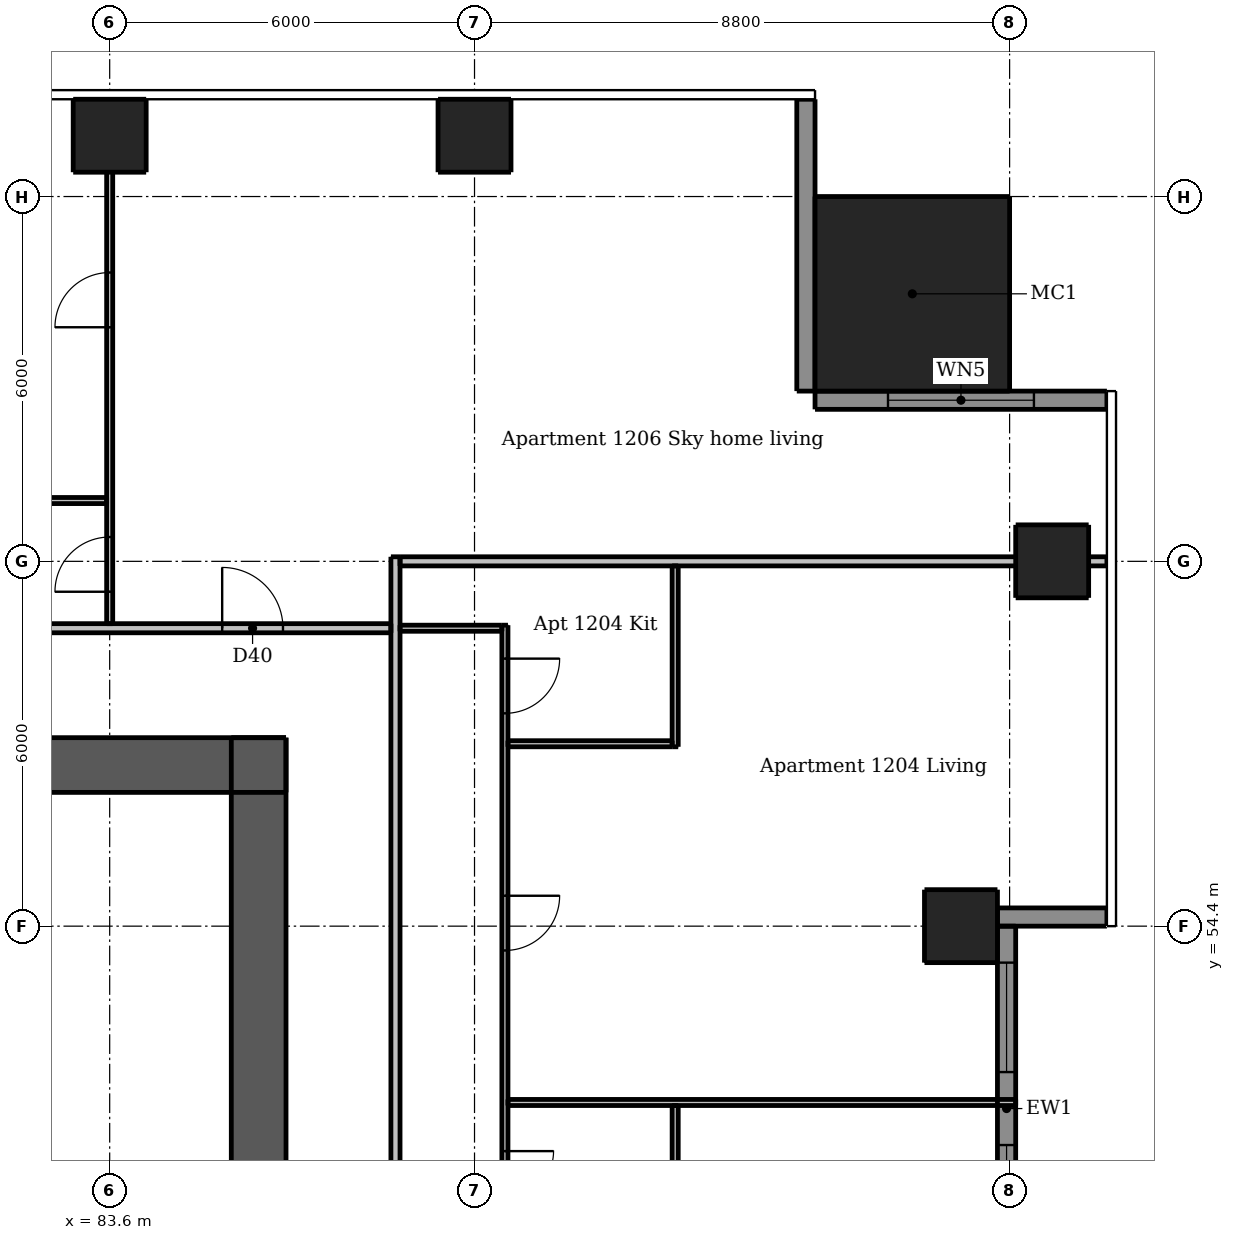
"""IFC4 building model, lengths in metres.
Left out: names, types, materials, properties, quantities, classifications, styles, units other than length and angle.
Written with IfcOpenShell. Run it as: python <this file> out.ifc"""

import sys

from ifc_helpers import new_model, si_unit, direction, frame, frame_2d, origin, origin_2d, place, context, subcontext, project, spatial, rectangle, extrude, element, fill, save


model = new_model("IFC4")
c1 = context("Model", 3, precision=1e-05, world=origin(), true_north=direction((0.0, 1.0)))
c2 = subcontext(c1, "Body", "Model", "MODEL_VIEW")
j1 = project(units=[si_unit("LENGTHUNIT", "METRE"), si_unit("PLANEANGLEUNIT", "RADIAN")], contexts=[c1])
p1 = place(None, origin())
s1 = spatial("IfcSite", under=j1, at=p1, CompositionType="ELEMENT")
p2 = place(p1, origin())
s2 = spatial("IfcBuilding", under=s1, at=p2, CompositionType="ELEMENT")
p3 = place(p2, frame((0.0, 0.0, 46.6)))
s3 = spatial("IfcBuildingStorey", under=s2, at=p3, CompositionType="ELEMENT", Elevation=46.6)
p4 = place(p3, frame((62.5, 57.05, 0.0), z_axis=(0.0, 0.0, 1.0), x_axis=(1.0, 0.0, 0.0)))
e1 = element("IfcWall", 1, at=p4, inside=s3, PredefinedType="SHEAR", context=c2, shape_type="SweptSolid", body=[
    extrude(rectangle(XDim=24.0, YDim=0.9, at=frame_2d((12.0, 0.0))), origin(), (0.0, 0.0, 1.0), 3.05),
])
p5 = place(p4, frame((20.85, 0.0, 0.0)))
e2 = element("IfcOpeningElement", 2, at=p5, cuts=e1, PredefinedType="OPENING", context=c2, shape_type="SweptSolid", body=[
    extrude(rectangle(XDim=1.1, YDim=2.1, at=frame_2d((0.55, 1.05))), frame((0.0, 0.46, 0.0), z_axis=(0.0, -1.0, 0.0), x_axis=(1.0, 0.0, 0.0)), (0.0, 0.0, 1.0), 0.92),
])
p6 = place(p4, frame((2.05, 0.0, 0.0)))
e3 = element("IfcOpeningElement", 3, at=p6, cuts=e1, PredefinedType="OPENING", context=c2, shape_type="SweptSolid", body=[
    extrude(rectangle(XDim=1.1, YDim=2.1, at=frame_2d((0.55, 1.05))), frame((0.0, 0.46, 0.0), z_axis=(0.0, -1.0, 0.0), x_axis=(1.0, 0.0, 0.0)), (0.0, 0.0, 1.0), 0.92),
])
p7 = place(p4, frame((6.075, 0.0, 0.0)))
e4 = element("IfcOpeningElement", 4, at=p7, cuts=e1, PredefinedType="OPENING", context=c2, shape_type="SweptSolid", body=[
    extrude(rectangle(XDim=0.9, YDim=2.1, at=frame_2d((0.45, 1.05))), frame((0.0, 0.46, 0.0), z_axis=(0.0, -1.0, 0.0), x_axis=(1.0, 0.0, 0.0)), (0.0, 0.0, 1.0), 0.92),
])
p8 = place(p4, frame((10.455, 0.0, 0.0)))
e5 = element("IfcOpeningElement", 5, at=p8, cuts=e1, PredefinedType="OPENING", context=c2, shape_type="SweptSolid", body=[
    extrude(rectangle(XDim=0.9, YDim=2.1, at=frame_2d((0.45, 1.05))), frame((0.0, 0.46, 0.0), z_axis=(0.0, -1.0, 0.0), x_axis=(1.0, 0.0, 0.0)), (0.0, 0.0, 1.0), 0.92),
])
p9 = place(p4, frame((15.93, 0.0, 0.0)))
e6 = element("IfcOpeningElement", 6, at=p9, cuts=e1, PredefinedType="OPENING", context=c2, shape_type="SweptSolid", body=[
    extrude(rectangle(XDim=0.9, YDim=2.1, at=frame_2d((0.45, 1.05))), frame((0.0, 0.46, 0.0), z_axis=(0.0, -1.0, 0.0), x_axis=(1.0, 0.0, 0.0)), (0.0, 0.0, 1.0), 0.92),
])
p10 = place(p3, frame((86.05, 33.5, 0.0), z_axis=(0.0, 0.0, 1.0), x_axis=(0.0, 1.0, 0.0)))
e7 = element("IfcWall", 7, at=p10, inside=s3, PredefinedType="SHEAR", context=c2, shape_type="SweptSolid", body=[
    extrude(rectangle(XDim=24.0, YDim=0.9, at=frame_2d((12.0, 0.0))), origin(), (0.0, 0.0, 1.0), 3.05),
])
p11 = place(p10, frame((11.2, 0.0, 0.0)))
e8 = element("IfcOpeningElement", 8, at=p11, cuts=e7, PredefinedType="OPENING", context=c2, shape_type="SweptSolid", body=[
    extrude(rectangle(XDim=1.6, YDim=2.1, at=frame_2d((0.8, 1.05))), frame((0.0, 0.46, 0.0), z_axis=(0.0, -1.0, 0.0), x_axis=(1.0, 0.0, 0.0)), (0.0, 0.0, 1.0), 0.92),
])
for number, where, z_axis, x_axis in (
    (9, (97.6, 54.4, 0.0), (0.0, 0.0, 1.0), (1.0, 0.0, 0.0)),
    (10, (99.1, 60.4, 0.0), (0.0, 0.0, 1.0), (1.0, 0.0, 0.0)),
    (11, (83.6, 67.4, 0.0), (0.0, 0.0, 1.0), (1.0, 0.0, 0.0)),
    (12, (89.6, 67.4, 0.0), (0.0, 0.0, 1.0), (1.0, 0.0, 0.0)),
):
    element("IfcColumn", number, at=place(p3, frame(where, z_axis=z_axis, x_axis=x_axis)), inside=s3, PredefinedType="COLUMN", context=c2, shape_type="SweptSolid", body=[
        extrude(rectangle(XDim=1.2, YDim=1.2, at=origin_2d()), origin(), (0.0, 0.0, 1.0), 3.05),
    ])
p12 = place(p3, frame((96.8, 64.8, 0.0), z_axis=(0.0, 0.0, 1.0), x_axis=(1.0, 0.0, 0.0)))
e13 = element("IfcColumn", 13, at=p12, inside=s3, PredefinedType="COLUMN", context=c2, shape_type="SweptSolid", body=[
    extrude(rectangle(XDim=3.2, YDim=3.2, at=origin_2d()), origin(), (0.0, 0.0, 1.0), 3.3),
])
p13 = place(p3, frame((98.2, 54.55, 0.0), z_axis=(0.0, 0.0, 1.0), x_axis=(1.0, 0.0, 0.0)))
e14 = element("IfcWall", 14, at=p13, inside=s3, PredefinedType="SOLIDWALL", context=c2, shape_type="SweptSolid", body=[
    extrude(rectangle(XDim=1.8, YDim=0.3, at=frame_2d((0.9, 0.0))), origin(), (0.0, 0.0, 1.0), 3.05),
])
p14 = place(p3, frame((100.0, 63.05, 0.0), z_axis=(0.0, 0.0, 1.0), x_axis=(-1.0, 0.0, 0.0)))
e15 = element("IfcWall", 15, at=p14, inside=s3, PredefinedType="SOLIDWALL", context=c2, shape_type="SweptSolid", body=[
    extrude(rectangle(XDim=4.8, YDim=0.3, at=frame_2d((2.4, 0.0))), origin(), (0.0, 0.0, 1.0), 3.05),
])
p15 = place(p14, frame((1.2, 0.0, 0.15)))
e16 = element("IfcOpeningElement", 16, at=p15, cuts=e15, PredefinedType="OPENING", context=c2, shape_type="SweptSolid", body=[
    extrude(rectangle(XDim=2.4, YDim=2.1, at=frame_2d((1.2, 1.05))), frame((0.0, 0.16, 0.0), z_axis=(0.0, -1.0, 0.0), x_axis=(1.0, 0.0, 0.0)), (0.0, 0.0, 1.0), 0.32),
])
p16 = place(p3, frame((95.05, 63.2, 0.0), z_axis=(0.0, 0.0, 1.0), x_axis=(0.0, 1.0, 0.0)))
e17 = element("IfcWall", 17, at=p16, inside=s3, PredefinedType="SOLIDWALL", context=c2, shape_type="SweptSolid", body=[
    extrude(rectangle(XDim=4.8, YDim=0.3, at=frame_2d((2.4, 0.0))), origin(), (0.0, 0.0, 1.0), 3.05),
])
p17 = place(p3, frame((98.35, 48.4, 0.0), z_axis=(0.0, 0.0, 1.0), x_axis=(0.0, 1.0, 0.0)))
e18 = element("IfcWall", 18, at=p17, inside=s3, PredefinedType="SOLIDWALL", context=c2, shape_type="SweptSolid", body=[
    extrude(rectangle(XDim=6.0, YDim=0.3, at=frame_2d((3.0, 0.0))), origin(), (0.0, 0.0, 1.0), 3.05),
])
p18 = place(p17, frame((0.6, 0.0, 0.15)))
e19 = element("IfcOpeningElement", 19, at=p18, cuts=e18, PredefinedType="OPENING", context=c2, shape_type="SweptSolid", body=[
    extrude(rectangle(XDim=1.8, YDim=2.1, at=frame_2d((0.9, 1.05))), frame((0.0, 0.16, 0.0), z_axis=(0.0, -1.0, 0.0), x_axis=(1.0, 0.0, 0.0)), (0.0, 0.0, 1.0), 0.32),
])
p19 = place(p17, frame((3.6, 0.0, 0.15)))
e20 = element("IfcOpeningElement", 20, at=p19, cuts=e18, PredefinedType="OPENING", context=c2, shape_type="SweptSolid", body=[
    extrude(rectangle(XDim=1.8, YDim=2.1, at=frame_2d((0.9, 1.05))), frame((0.0, 0.16, 0.0), z_axis=(0.0, -1.0, 0.0), x_axis=(1.0, 0.0, 0.0)), (0.0, 0.0, 1.0), 0.32),
])
p20 = place(p3, frame((83.6, 59.375, 0.0), z_axis=(0.0, 0.0, 1.0), x_axis=(0.0, 1.0, 0.0)))
e21 = element("IfcWall", 21, at=p20, inside=s3, PredefinedType="PARTITIONING", context=c2, shape_type="SweptSolid", body=[
    extrude(rectangle(XDim=8.625, YDim=0.1, at=frame_2d((4.312, 0.0))), origin(), (0.0, 0.0, 1.0), 2.516),
])
p21 = place(p20, frame((0.525, 0.0, 0.0)))
e22 = element("IfcOpeningElement", 22, at=p21, cuts=e21, PredefinedType="OPENING", context=c2, shape_type="SweptSolid", body=[
    extrude(rectangle(XDim=0.9, YDim=2.1, at=frame_2d((0.45, 1.05))), frame((0.0, 0.06, 0.0), z_axis=(0.0, -1.0, 0.0), x_axis=(1.0, 0.0, 0.0)), (0.0, 0.0, 1.0), 0.12),
])
p22 = place(p20, frame((4.875, 0.0, 0.0)))
e23 = element("IfcOpeningElement", 23, at=p22, cuts=e21, PredefinedType="OPENING", context=c2, shape_type="SweptSolid", body=[
    extrude(rectangle(XDim=0.9, YDim=2.1, at=frame_2d((0.45, 1.05))), frame((0.0, 0.06, 0.0), z_axis=(0.0, -1.0, 0.0), x_axis=(1.0, 0.0, 0.0)), (0.0, 0.0, 1.0), 0.12),
])
p23 = place(p3, frame((90.1, 59.35, 0.0), z_axis=(0.0, 0.0, 1.0), x_axis=(0.0, -1.0, 0.0)))
e24 = element("IfcWall", 24, at=p23, inside=s3, PredefinedType="PARTITIONING", context=c2, shape_type="SweptSolid", body=[
    extrude(rectangle(XDim=19.775, YDim=0.1, at=frame_2d((9.888, 0.0))), origin(), (0.0, 0.0, 1.0), 3.05),
])
p24 = place(p23, frame((4.45, 0.0, 0.0)))
e25 = element("IfcOpeningElement", 25, at=p24, cuts=e24, PredefinedType="OPENING", context=c2, shape_type="SweptSolid", body=[
    extrude(rectangle(XDim=0.9, YDim=2.1, at=frame_2d((0.45, 1.05))), frame((0.0, 0.06, 0.0), z_axis=(0.0, -1.0, 0.0), x_axis=(1.0, 0.0, 0.0)), (0.0, 0.0, 1.0), 0.12),
])
p25 = place(p23, frame((0.55, 0.0, 0.0)))
e26 = element("IfcOpeningElement", 26, at=p25, cuts=e24, PredefinedType="OPENING", context=c2, shape_type="SweptSolid", body=[
    extrude(rectangle(XDim=0.9, YDim=2.1, at=frame_2d((0.45, 1.05))), frame((0.0, 0.06, 0.0), z_axis=(0.0, -1.0, 0.0), x_axis=(1.0, 0.0, 0.0)), (0.0, 0.0, 1.0), 0.12),
])
p26 = place(p23, frame((17.6, 0.0, 0.0)))
e27 = element("IfcOpeningElement", 27, at=p26, cuts=e24, PredefinedType="OPENING", context=c2, shape_type="SweptSolid", body=[
    extrude(rectangle(XDim=0.9, YDim=2.1, at=frame_2d((0.45, 1.05))), frame((0.0, 0.06, 0.0), z_axis=(0.0, -1.0, 0.0), x_axis=(1.0, 0.0, 0.0)), (0.0, 0.0, 1.0), 0.12),
])
p27 = place(p23, frame((11.6, 0.0, 0.0)))
e28 = element("IfcOpeningElement", 28, at=p27, cuts=e24, PredefinedType="OPENING", context=c2, shape_type="SweptSolid", body=[
    extrude(rectangle(XDim=0.9, YDim=2.1, at=frame_2d((0.45, 1.05))), frame((0.0, 0.06, 0.0), z_axis=(0.0, -1.0, 0.0), x_axis=(1.0, 0.0, 0.0)), (0.0, 0.0, 1.0), 0.12),
])
p28 = place(p23, frame((14.65, 0.0, 0.0)))
e29 = element("IfcOpeningElement", 29, at=p28, cuts=e24, PredefinedType="OPENING", context=c2, shape_type="SweptSolid", body=[
    extrude(rectangle(XDim=0.8, YDim=2.1, at=frame_2d((0.4, 1.05))), frame((0.0, 0.06, 0.0), z_axis=(0.0, -1.0, 0.0), x_axis=(1.0, 0.0, 0.0)), (0.0, 0.0, 1.0), 0.12),
])
p29 = place(p23, frame((8.65, 0.0, 0.0)))
e30 = element("IfcOpeningElement", 30, at=p29, cuts=e24, PredefinedType="OPENING", context=c2, shape_type="SweptSolid", body=[
    extrude(rectangle(XDim=0.8, YDim=2.1, at=frame_2d((0.4, 1.05))), frame((0.0, 0.06, 0.0), z_axis=(0.0, -1.0, 0.0), x_axis=(1.0, 0.0, 0.0)), (0.0, 0.0, 1.0), 0.12),
])
p30 = place(p3, frame((92.9, 49.05, 0.0), z_axis=(0.0, 0.0, 1.0), x_axis=(0.0, 1.0, 0.0)))
e31 = element("IfcWall", 31, at=p30, inside=s3, PredefinedType="PARTITIONING", context=c2, shape_type="SweptSolid", body=[
    extrude(rectangle(XDim=2.4, YDim=0.1, at=frame_2d((1.2, 0.0))), origin(), (0.0, 0.0, 1.0), 3.05),
])
p31 = place(p3, frame((92.9, 57.35, 0.0), z_axis=(0.0, 0.0, 1.0), x_axis=(0.0, 1.0, 0.0)))
e32 = element("IfcWall", 32, at=p31, inside=s3, PredefinedType="PARTITIONING", context=c2, shape_type="SweptSolid", body=[
    extrude(rectangle(XDim=2.975, YDim=0.1, at=frame_2d((1.487, 0.0))), origin(), (0.0, 0.0, 1.0), 3.05),
])
p32 = place(p3, frame((83.55, 61.4, 0.0), z_axis=(0.0, 0.0, 1.0), x_axis=(-1.0, 0.0, 0.0)))
e33 = element("IfcWall", 33, at=p32, inside=s3, PredefinedType="PARTITIONING", context=c2, shape_type="SweptSolid", body=[
    extrude(rectangle(XDim=5.875, YDim=0.1, at=frame_2d((2.938, 0.0))), origin(), (0.0, 0.0, 1.0), 3.05),
])
p33 = place(p32, frame((3.75, 0.0, 0.0)))
e34 = element("IfcOpeningElement", 34, at=p33, cuts=e33, PredefinedType="OPENING", context=c2, shape_type="SweptSolid", body=[
    extrude(rectangle(XDim=0.8, YDim=2.1, at=frame_2d((0.4, 1.05))), frame((0.0, 0.06, 0.0), z_axis=(0.0, -1.0, 0.0), x_axis=(1.0, 0.0, 0.0)), (0.0, 0.0, 1.0), 0.12),
])
p34 = place(p3, frame((88.375, 59.3, 0.0), z_axis=(0.0, 0.0, 1.0), x_axis=(1.0, 0.0, 0.0)))
e35 = element("IfcWall", 35, at=p34, inside=s3, PredefinedType="PARTITIONING", context=c2, shape_type="SweptSolid", body=[
    extrude(rectangle(XDim=1.675, YDim=0.1, at=frame_2d((0.837, 0.0))), origin(), (0.0, 0.0, 1.0), 3.05),
])
p35 = place(p3, frame((90.15, 57.4, 0.0), z_axis=(0.0, 0.0, 1.0), x_axis=(1.0, 0.0, 0.0)))
e36 = element("IfcWall", 36, at=p35, inside=s3, PredefinedType="PARTITIONING", context=c2, shape_type="SweptSolid", body=[
    extrude(rectangle(XDim=2.7, YDim=0.1, at=frame_2d((1.35, 0.0))), origin(), (0.0, 0.0, 1.0), 3.05),
])
p36 = place(p3, frame((90.15, 51.5, 0.0), z_axis=(0.0, 0.0, 1.0), x_axis=(1.0, 0.0, 0.0)))
e37 = element("IfcWall", 37, at=p36, inside=s3, PredefinedType="PARTITIONING", context=c2, shape_type="SweptSolid", body=[
    extrude(rectangle(XDim=8.35, YDim=0.1, at=frame_2d((4.175, 0.0))), origin(), (0.0, 0.0, 1.0), 3.05),
])
p37 = place(p3, frame((88.3, 60.475, 0.0), z_axis=(0.0, 0.0, 1.0), x_axis=(0.0, -1.0, 0.0)))
e38 = element("IfcWall", 38, at=p37, inside=s3, PredefinedType="PARTITIONING", context=c2, shape_type="SweptSolid", body=[
    extrude(rectangle(XDim=28.7, YDim=0.15, at=frame_2d((14.35, 0.0))), origin(), (0.0, 0.0, 1.0), 3.05),
])
p38 = place(p37, frame((27.425, 0.0, 0.0)))
e39 = element("IfcOpeningElement", 39, at=p38, cuts=e38, PredefinedType="OPENING", context=c2, shape_type="SweptSolid", body=[
    extrude(rectangle(XDim=1.0, YDim=2.1, at=frame_2d((0.5, 1.05))), frame((0.0, 0.085, 0.0), z_axis=(0.0, -1.0, 0.0), x_axis=(1.0, 0.0, 0.0)), (0.0, 0.0, 1.0), 0.17),
])
p39 = place(p37, frame((10.575, 0.0, 0.0)))
e40 = element("IfcOpeningElement", 40, at=p39, cuts=e38, PredefinedType="OPENING", context=c2, shape_type="SweptSolid", body=[
    extrude(rectangle(XDim=1.0, YDim=2.1, at=frame_2d((0.5, 1.05))), frame((0.0, 0.085, 0.0), z_axis=(0.0, -1.0, 0.0), x_axis=(1.0, 0.0, 0.0)), (0.0, 0.0, 1.0), 0.17),
])
p40 = place(p3, frame((88.375, 60.4, 0.0), z_axis=(0.0, 0.0, 1.0), x_axis=(1.0, 0.0, 0.0)))
e41 = element("IfcWall", 41, at=p40, inside=s3, PredefinedType="PARTITIONING", context=c2, shape_type="SweptSolid", body=[
    extrude(rectangle(XDim=11.625, YDim=0.15, at=frame_2d((5.812, 0.0))), origin(), (0.0, 0.0, 1.0), 2.516),
])
p41 = place(p3, frame((59.675, 59.3, 0.0), z_axis=(0.0, 0.0, 1.0), x_axis=(1.0, 0.0, 0.0)))
e42 = element("IfcWall", 42, at=p41, inside=s3, PredefinedType="PARTITIONING", context=c2, shape_type="SweptSolid", body=[
    extrude(rectangle(XDim=28.55, YDim=0.15, at=frame_2d((14.275, 0.0))), origin(), (0.0, 0.0, 1.0), 3.05),
])
p42 = place(p41, frame((8.975, 0.0, 0.0)))
e43 = element("IfcOpeningElement", 43, at=p42, cuts=e42, PredefinedType="OPENING", context=c2, shape_type="SweptSolid", body=[
    extrude(rectangle(XDim=1.0, YDim=2.1, at=frame_2d((0.5, 1.05))), frame((0.0, 0.085, 0.0), z_axis=(0.0, -1.0, 0.0), x_axis=(1.0, 0.0, 0.0)), (0.0, 0.0, 1.0), 0.17),
])
p43 = place(p41, frame((25.775, 0.0, 0.0)))
e44 = element("IfcOpeningElement", 44, at=p43, cuts=e42, PredefinedType="OPENING", context=c2, shape_type="SweptSolid", body=[
    extrude(rectangle(XDim=1.0, YDim=2.1, at=frame_2d((0.5, 1.05))), frame((0.0, 0.085, 0.0), z_axis=(0.0, -1.0, 0.0), x_axis=(1.0, 0.0, 0.0)), (0.0, 0.0, 1.0), 0.17),
])
p44 = place(p15, origin())
e45 = element("IfcWindow", 45, at=p44, inside=s3, PartitioningType="DOUBLE_PANEL_VERTICAL", PredefinedType="WINDOW", context=c2, shape_type="SweptSolid", body=[
    extrude(rectangle(XDim=2.4, YDim=2.1, at=frame_2d((1.2, 1.05))), frame((0.0, 0.03, 0.0), z_axis=(0.0, -1.0, 0.0), x_axis=(1.0, 0.0, 0.0)), (0.0, 0.0, 1.0), 0.06),
])
fill(e16, e45)
p45 = place(p18, origin())
e46 = element("IfcWindow", 46, at=p45, inside=s3, PartitioningType="DOUBLE_PANEL_VERTICAL", PredefinedType="WINDOW", context=c2, shape_type="SweptSolid", body=[
    extrude(rectangle(XDim=1.8, YDim=2.1, at=frame_2d((0.9, 1.05))), frame((0.0, 0.03, 0.0), z_axis=(0.0, -1.0, 0.0), x_axis=(1.0, 0.0, 0.0)), (0.0, 0.0, 1.0), 0.06),
])
fill(e19, e46)
p46 = place(p19, origin())
e47 = element("IfcWindow", 47, at=p46, inside=s3, PartitioningType="DOUBLE_PANEL_VERTICAL", PredefinedType="WINDOW", context=c2, shape_type="SweptSolid", body=[
    extrude(rectangle(XDim=1.8, YDim=2.1, at=frame_2d((0.9, 1.05))), frame((0.0, 0.03, 0.0), z_axis=(0.0, -1.0, 0.0), x_axis=(1.0, 0.0, 0.0)), (0.0, 0.0, 1.0), 0.06),
])
fill(e20, e47)
p47 = place(p5, origin())
e48 = element("IfcDoor", 48, at=p47, inside=s3, OperationType="SINGLE_SWING_RIGHT", PredefinedType="DOOR", context=c2, shape_type="SweptSolid", body=[
    extrude(rectangle(XDim=1.1, YDim=2.1, at=frame_2d((0.55, 1.05))), frame((0.0, -0.388, 0.0), z_axis=(0.0, -1.0, 0.0), x_axis=(1.0, 0.0, 0.0)), (0.0, 0.0, 1.0), 0.05),
])
fill(e2, e48)
p48 = place(p24, origin())
e49 = element("IfcDoor", 49, at=p48, inside=s3, OperationType="SINGLE_SWING_LEFT", PredefinedType="DOOR", context=c2, shape_type="SweptSolid", body=[
    extrude(rectangle(XDim=0.9, YDim=2.1, at=frame_2d((0.45, 1.05))), frame((0.0, 0.025, 0.0), z_axis=(0.0, -1.0, 0.0), x_axis=(1.0, 0.0, 0.0)), (0.0, 0.0, 1.0), 0.05),
])
fill(e25, e49)
p49 = place(p25, origin())
e50 = element("IfcDoor", 50, at=p49, inside=s3, OperationType="SINGLE_SWING_LEFT", PredefinedType="DOOR", context=c2, shape_type="SweptSolid", body=[
    extrude(rectangle(XDim=0.9, YDim=2.1, at=frame_2d((0.45, 1.05))), frame((0.0, 0.025, 0.0), z_axis=(0.0, -1.0, 0.0), x_axis=(1.0, 0.0, 0.0)), (0.0, 0.0, 1.0), 0.05),
])
fill(e26, e50)
p50 = place(p29, origin())
e51 = element("IfcDoor", 51, at=p50, inside=s3, OperationType="SINGLE_SWING_LEFT", PredefinedType="DOOR", context=c2, shape_type="SweptSolid", body=[
    extrude(rectangle(XDim=0.8, YDim=2.1, at=frame_2d((0.4, 1.05))), frame((0.0, 0.025, 0.0), z_axis=(0.0, -1.0, 0.0), x_axis=(1.0, 0.0, 0.0)), (0.0, 0.0, 1.0), 0.05),
])
fill(e30, e51)
p51 = place(p43, origin())
e52 = element("IfcDoor", 52, at=p51, inside=s3, OperationType="SINGLE_SWING_LEFT", PredefinedType="DOOR", context=c2, shape_type="SweptSolid", body=[
    extrude(rectangle(XDim=1.0, YDim=2.1, at=frame_2d((0.5, 1.05))), frame((0.0, 0.025, 0.0), z_axis=(0.0, -1.0, 0.0), x_axis=(1.0, 0.0, 0.0)), (0.0, 0.0, 1.0), 0.05),
])
fill(e44, e52)
p52 = place(p21, origin())
e53 = element("IfcDoor", 53, at=p52, inside=s3, OperationType="SINGLE_SWING_LEFT", PredefinedType="DOOR", context=c2, shape_type="SweptSolid", body=[
    extrude(rectangle(XDim=0.9, YDim=2.1, at=frame_2d((0.45, 1.05))), frame((0.0, 0.025, 0.0), z_axis=(0.0, -1.0, 0.0), x_axis=(1.0, 0.0, 0.0)), (0.0, 0.0, 1.0), 0.05),
])
fill(e22, e53)
p53 = place(p22, origin())
e54 = element("IfcDoor", 54, at=p53, inside=s3, OperationType="SINGLE_SWING_LEFT", PredefinedType="DOOR", context=c2, shape_type="SweptSolid", body=[
    extrude(rectangle(XDim=0.9, YDim=2.1, at=frame_2d((0.45, 1.05))), frame((0.0, 0.025, 0.0), z_axis=(0.0, -1.0, 0.0), x_axis=(1.0, 0.0, 0.0)), (0.0, 0.0, 1.0), 0.05),
])
fill(e23, e54)
save(model, sys.argv[1])
